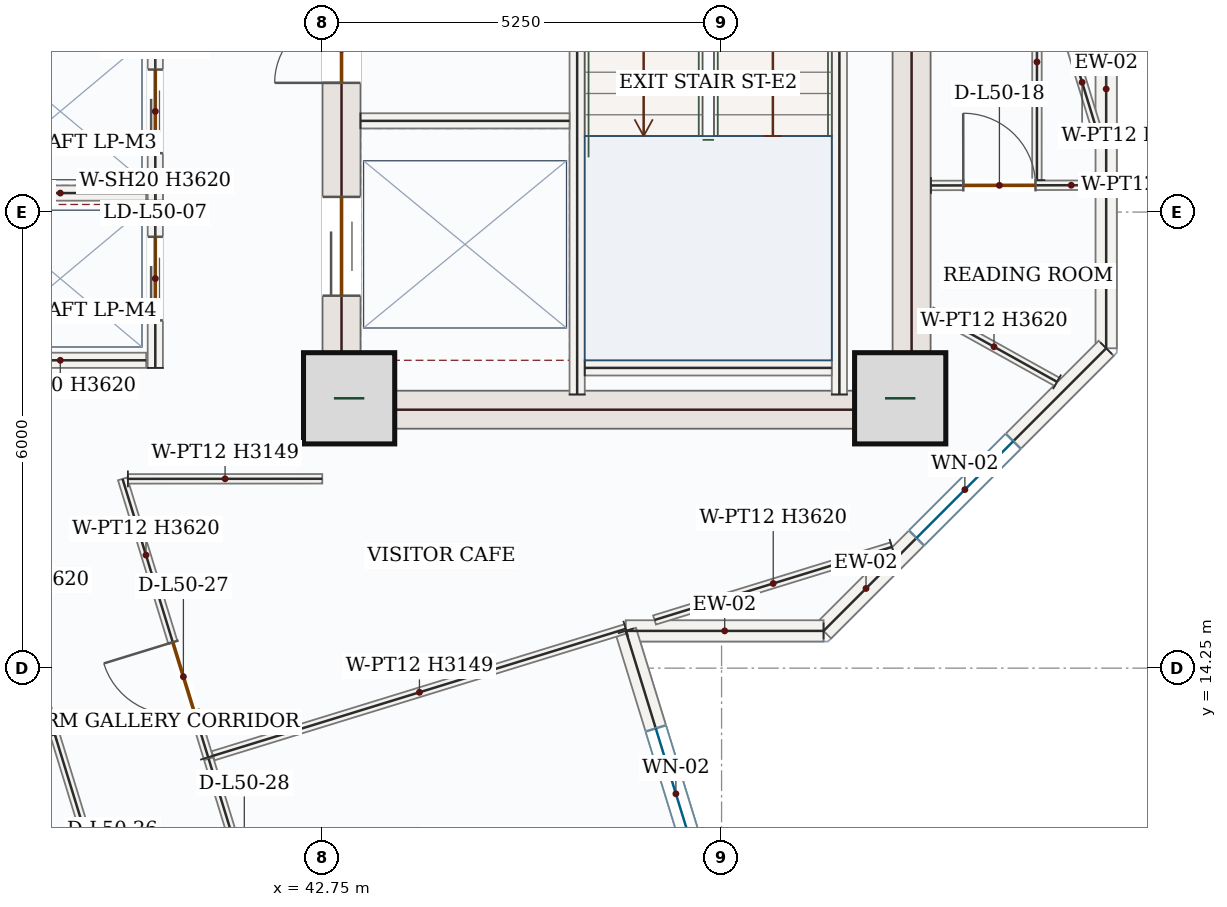
"""IFC4 building model, lengths in metres.
Left out: names, types, materials, properties, quantities, classifications, styles, units other than length and angle.
Written with IfcOpenShell. Run it as: python <this file> out.ifc"""

import sys

from ifc_helpers import new_model, si_unit, direction, frame, frame_2d, origin, origin_2d, place, context, subcontext, project, spatial, rectangle, extrude, source, transform, mapped, element, fill, save


model = new_model("IFC4")
c1 = context("Model", 3, precision=1e-05, world=origin(), true_north=direction((0.0, 1.0)))
c2 = subcontext(c1, "Body", "Model", "MODEL_VIEW")
j1 = project(units=[si_unit("LENGTHUNIT", "METRE"), si_unit("PLANEANGLEUNIT", "RADIAN")], contexts=[c1])
p1 = place(None, origin())
s1 = spatial("IfcSite", under=j1, at=p1, CompositionType="ELEMENT")
p2 = place(p1, origin())
s2 = spatial("IfcBuilding", under=s1, at=p2, CompositionType="ELEMENT")
p3 = place(p2, frame((0.0, 0.0, 213.6)))
s3 = spatial("IfcBuildingStorey", under=s2, at=p3, CompositionType="ELEMENT", Elevation=213.6)
p4 = place(p3, frame((43.0, 17.4, 0.0), z_axis=(0.0, 0.0, 1.0), x_axis=(0.0, 1.0, 0.0)))
e1 = element("IfcWall", 1, at=p4, inside=s3, PredefinedType="SHEAR", context=c2, shape_type="SweptSolid", body=[
    extrude(rectangle(XDim=8.55, YDim=0.5, at=frame_2d((4.275, 0.0))), origin(), (0.0, 0.0, 1.0), 3.62),
])
p5 = place(p4, frame((6.65, 0.0, 0.0)))
e2 = element("IfcOpeningElement", 2, at=p5, cuts=e1, PredefinedType="OPENING", context=c2, shape_type="SweptSolid", body=[
    extrude(rectangle(XDim=1.1, YDim=2.2, at=frame_2d((0.55, 1.1))), frame((0.0, 0.26, 0.0), z_axis=(0.0, -1.0, 0.0), x_axis=(1.0, 0.0, 0.0)), (0.0, 0.0, 1.0), 0.52),
])
p6 = place(p4, frame((1.75, 0.0, 0.0)))
e3 = element("IfcOpeningElement", 3, at=p6, cuts=e1, PredefinedType="OPENING", context=c2, shape_type="SweptSolid", body=[
    extrude(rectangle(XDim=1.3, YDim=2.2, at=frame_2d((0.65, 1.1))), frame((0.0, 0.26, 0.0), z_axis=(0.0, -1.0, 0.0), x_axis=(1.0, 0.0, 0.0)), (0.0, 0.0, 1.0), 0.52),
])
p7 = place(p4, frame((4.55, 0.0, 0.0)))
e4 = element("IfcOpeningElement", 4, at=p7, cuts=e1, PredefinedType="OPENING", context=c2, shape_type="SweptSolid", body=[
    extrude(rectangle(XDim=0.88, YDim=2.1, at=frame_2d((0.44, 1.05))), frame((0.0, 0.26, 0.0), z_axis=(0.0, -1.0, 0.0), x_axis=(1.0, 0.0, 0.0)), (0.0, 0.0, 1.0), 0.52),
])
m1 = source(origin(), c2, "Body", "SweptSolid", [
    extrude(rectangle(XDim=8.55, YDim=0.5, at=frame_2d((4.275, 0.0))), origin(), (0.0, 0.0, 1.0), 3.62),
])
p8 = place(p3, frame((50.5, 17.4, 0.0), z_axis=(0.0, 0.0, 1.0), x_axis=(0.0, 1.0, 0.0)))
e5 = element("IfcWall", 5, at=p8, inside=s3, PredefinedType="SHEAR", context=c2, shape_type="MappedRepresentation", body=[
    mapped(m1, transform((0.0, 0.0, 0.0), x_axis=(1.0, 0.0, 0.0), y_axis=(0.0, 1.0, 0.0), z_axis=(0.0, 0.0, 1.0), scale=1.0)),
])
m2 = source(origin(), c2, "Body", "SweptSolid", [
    extrude(rectangle(XDim=7.0, YDim=0.5, at=frame_2d((3.5, 0.0))), origin(), (0.0, 0.0, 1.0), 3.62),
])
p9 = place(p3, frame((43.25, 17.65, 0.0), z_axis=(0.0, 0.0, 1.0), x_axis=(1.0, 0.0, 0.0)))
e6 = element("IfcWall", 6, at=p9, inside=s3, PredefinedType="SHEAR", context=c2, shape_type="MappedRepresentation", body=[
    mapped(m2, transform((0.0, 0.0, 0.0), x_axis=(1.0, 0.0, 0.0), y_axis=(0.0, 1.0, 0.0), z_axis=(0.0, 0.0, 1.0), scale=1.0)),
])
m3 = source(origin(), c2, "Body", "SweptSolid", [
    extrude(rectangle(XDim=1.2, YDim=1.2, at=origin_2d()), origin(), (0.0, 0.0, 1.0), 3.9),
])
for number, where, z_axis, x_axis in (
    (7, (43.1, 17.8, 0.0), (0.0, 0.0, 1.0), (1.0, 0.0, 0.0)),
    (8, (50.35, 17.8, 0.0), (0.0, 0.0, 1.0), (1.0, 0.0, 0.0)),
):
    element("IfcColumn", number, at=place(p3, frame(where, z_axis=z_axis, x_axis=x_axis)), inside=s3, PredefinedType="COLUMN", context=c2, shape_type="MappedRepresentation", body=[
        mapped(m3, transform((0.0, 0.0, 0.0), x_axis=(1.0, 0.0, 0.0), y_axis=(0.0, 1.0, 0.0), z_axis=(0.0, 0.0, 1.0), scale=1.0)),
    ])
m4 = source(origin(), c2, "Body", "SweptSolid", [
    extrude(rectangle(XDim=6.822, YDim=0.28, at=frame_2d((3.411, 0.0))), origin(), (0.0, 0.0, 1.0), 3.62),
])
p10 = place(p3, frame((53.06, 25.28, 0.0), z_axis=(0.0, 0.0, 1.0), x_axis=(0.0, -1.0, 0.0)))
e9 = element("IfcWall", 9, at=p10, inside=s3, PredefinedType="SOLIDWALL", context=c2, shape_type="MappedRepresentation", body=[
    mapped(m4, transform((0.0, 0.0, 0.0), x_axis=(1.0, 0.0, 0.0), y_axis=(0.0, 1.0, 0.0), z_axis=(0.0, 0.0, 1.0), scale=1.0)),
])
p11 = place(p3, frame((53.06, 18.458, 0.0), z_axis=(0.0, 0.0, 1.0), x_axis=(-0.707106781187, -0.707106781187, 0.0)))
e10 = element("IfcWall", 10, at=p11, inside=s3, PredefinedType="SOLIDWALL", context=c2, shape_type="SweptSolid", body=[
    extrude(rectangle(XDim=5.258, YDim=0.28, at=frame_2d((2.629, 0.0))), origin(), (0.0, 0.0, 1.0), 3.62),
])
p12 = place(p11, frame((1.729, 0.0, 0.85)))
e11 = element("IfcOpeningElement", 11, at=p12, cuts=e10, PredefinedType="OPENING", context=c2, shape_type="SweptSolid", body=[
    extrude(rectangle(XDim=1.8, YDim=1.75, at=frame_2d((0.9, 0.875))), frame((0.0, 0.15, 0.0), z_axis=(0.0, -1.0, 0.0), x_axis=(1.0, 0.0, 0.0)), (0.0, 0.0, 1.0), 0.3),
])
m5 = source(origin(), c2, "Body", "SweptSolid", [
    extrude(rectangle(XDim=2.602, YDim=0.28, at=frame_2d((1.301, 0.0))), origin(), (0.0, 0.0, 1.0), 3.62),
])
p13 = place(p3, frame((49.342, 14.74, 0.0), z_axis=(0.0, 0.0, 1.0), x_axis=(-1.0, 0.0, 0.0)))
e12 = element("IfcWall", 12, at=p13, inside=s3, PredefinedType="SOLIDWALL", context=c2, shape_type="MappedRepresentation", body=[
    mapped(m5, transform((0.0, 0.0, 0.0), x_axis=(1.0, 0.0, 0.0), y_axis=(0.0, 1.0, 0.0), z_axis=(0.0, 0.0, 1.0), scale=1.0)),
])
p14 = place(p3, frame((46.74, 14.74, 0.0), z_axis=(0.0, 0.0, 1.0), x_axis=(0.294009328951, -0.95580254995, 0.0)))
e13 = element("IfcWall", 13, at=p14, inside=s3, PredefinedType="SOLIDWALL", context=c2, shape_type="SweptSolid", body=[
    extrude(rectangle(XDim=4.484, YDim=0.28, at=frame_2d((2.242, 0.0))), origin(), (0.0, 0.0, 1.0), 3.62),
])
p15 = place(p14, frame((1.342, 0.0, 0.85)))
e14 = element("IfcOpeningElement", 14, at=p15, cuts=e13, PredefinedType="OPENING", context=c2, shape_type="SweptSolid", body=[
    extrude(rectangle(XDim=1.8, YDim=1.75, at=frame_2d((0.9, 0.875))), frame((0.0, 0.15, 0.0), z_axis=(0.0, -1.0, 0.0), x_axis=(1.0, 0.0, 0.0)), (0.0, 0.0, 1.0), 0.3),
])
m6 = source(origin(), c2, "Body", "SweptSolid", [
    extrude(rectangle(XDim=7.87, YDim=0.2, at=frame_2d((3.935, 0.0))), origin(), (0.0, 0.0, 1.0), 3.62),
])
p16 = place(p3, frame((49.55, 17.85, 0.0), z_axis=(0.0, 0.0, 1.0), x_axis=(0.0, 1.0, 0.0)))
e15 = element("IfcWall", 15, at=p16, inside=s3, PredefinedType="SOLIDWALL", context=c2, shape_type="MappedRepresentation", body=[
    mapped(m6, transform((0.0, 0.0, 0.0), x_axis=(1.0, 0.0, 0.0), y_axis=(0.0, 1.0, 0.0), z_axis=(0.0, 0.0, 1.0), scale=1.0)),
])
p17 = place(p3, frame((46.1, 17.85, 0.0), z_axis=(0.0, 0.0, 1.0), x_axis=(0.0, 1.0, 0.0)))
e16 = element("IfcWall", 16, at=p17, inside=s3, PredefinedType="SOLIDWALL", context=c2, shape_type="SweptSolid", body=[
    extrude(rectangle(XDim=8.0, YDim=0.2, at=frame_2d((4.0, 0.0))), origin(), (0.0, 0.0, 1.0), 3.62),
])
p18 = place(p17, frame((6.3, 0.0, 0.0)))
e17 = element("IfcOpeningElement", 17, at=p18, cuts=e16, PredefinedType="OPENING", context=c2, shape_type="SweptSolid", body=[
    extrude(rectangle(XDim=1.05, YDim=2.15, at=frame_2d((0.525, 1.075))), frame((0.0, 0.11, 0.0), z_axis=(0.0, -1.0, 0.0), x_axis=(1.0, 0.0, 0.0)), (0.0, 0.0, 1.0), 0.22),
])
m7 = source(origin(), c2, "Body", "SweptSolid", [
    extrude(rectangle(XDim=3.25, YDim=0.2, at=frame_2d((1.625, 0.0))), origin(), (0.0, 0.0, 1.0), 3.62),
])
p19 = place(p3, frame((46.2, 18.2, 0.0), z_axis=(0.0, 0.0, 1.0), x_axis=(1.0, 0.0, 0.0)))
e18 = element("IfcWall", 18, at=p19, inside=s3, PredefinedType="SOLIDWALL", context=c2, shape_type="MappedRepresentation", body=[
    mapped(m7, transform((0.0, 0.0, 0.0), x_axis=(1.0, 0.0, 0.0), y_axis=(0.0, 1.0, 0.0), z_axis=(0.0, 0.0, 1.0), scale=1.0)),
])
m8 = source(origin(), c2, "Body", "SweptSolid", [
    extrude(rectangle(XDim=2.75, YDim=0.2, at=frame_2d((1.375, 0.0))), origin(), (0.0, 0.0, 1.0), 3.62),
])
p20 = place(p3, frame((43.25, 21.45, 0.0), z_axis=(0.0, 0.0, 1.0), x_axis=(1.0, 0.0, 0.0)))
e19 = element("IfcWall", 19, at=p20, inside=s3, PredefinedType="SOLIDWALL", context=c2, shape_type="MappedRepresentation", body=[
    mapped(m8, transform((0.0, 0.0, 0.0), x_axis=(1.0, 0.0, 0.0), y_axis=(0.0, 1.0, 0.0), z_axis=(0.0, 0.0, 1.0), scale=1.0)),
])
p21 = place(p3, frame((40.55, 20.4, 0.0), z_axis=(0.0, 0.0, 1.0), x_axis=(0.0, 1.0, 0.0)))
e20 = element("IfcWall", 20, at=p21, inside=s3, PredefinedType="SOLIDWALL", context=c2, shape_type="SweptSolid", body=[
    extrude(rectangle(XDim=2.35, YDim=0.2, at=frame_2d((1.175, 0.0))), origin(), (0.0, 0.0, 1.0), 3.62),
])
p22 = place(p21, frame((0.625, 0.0, 0.0)))
e21 = element("IfcOpeningElement", 21, at=p22, cuts=e20, PredefinedType="OPENING", context=c2, shape_type="SweptSolid", body=[
    extrude(rectangle(XDim=1.1, YDim=2.15, at=frame_2d((0.55, 1.075))), frame((0.0, 0.11, 0.0), z_axis=(0.0, -1.0, 0.0), x_axis=(1.0, 0.0, 0.0)), (0.0, 0.0, 1.0), 0.22),
])
m9 = source(origin(), c2, "Body", "SweptSolid", [
    extrude(rectangle(XDim=2.26, YDim=0.2, at=frame_2d((1.13, 0.0))), origin(), (0.0, 0.0, 1.0), 3.62),
])
p23 = place(p3, frame((38.17, 20.5, 0.0), z_axis=(0.0, 0.0, 1.0), x_axis=(1.0, 0.0, 0.0)))
e22 = element("IfcWall", 22, at=p23, inside=s3, PredefinedType="SOLIDWALL", context=c2, shape_type="MappedRepresentation", body=[
    mapped(m9, transform((0.0, 0.0, 0.0), x_axis=(1.0, 0.0, 0.0), y_axis=(0.0, 1.0, 0.0), z_axis=(0.0, 0.0, 1.0), scale=1.0)),
])
p24 = place(p3, frame((40.55, 18.2, 0.0), z_axis=(0.0, 0.0, 1.0), x_axis=(0.0, 1.0, 0.0)))
e23 = element("IfcWall", 23, at=p24, inside=s3, PredefinedType="SOLIDWALL", context=c2, shape_type="SweptSolid", body=[
    extrude(rectangle(XDim=2.35, YDim=0.2, at=frame_2d((1.175, 0.0))), origin(), (0.0, 0.0, 1.0), 3.62),
])
p25 = place(p24, frame((0.625, 0.0, 0.0)))
e24 = element("IfcOpeningElement", 24, at=p25, cuts=e23, PredefinedType="OPENING", context=c2, shape_type="SweptSolid", body=[
    extrude(rectangle(XDim=1.1, YDim=2.15, at=frame_2d((0.55, 1.075))), frame((0.0, 0.11, 0.0), z_axis=(0.0, -1.0, 0.0), x_axis=(1.0, 0.0, 0.0)), (0.0, 0.0, 1.0), 0.22),
])
p26 = place(p3, frame((38.17, 18.3, 0.0), z_axis=(0.0, 0.0, 1.0), x_axis=(1.0, 0.0, 0.0)))
e25 = element("IfcWall", 25, at=p26, inside=s3, PredefinedType="SOLIDWALL", context=c2, shape_type="MappedRepresentation", body=[
    mapped(m9, transform((0.0, 0.0, 0.0), x_axis=(1.0, 0.0, 0.0), y_axis=(0.0, 1.0, 0.0), z_axis=(0.0, 0.0, 1.0), scale=1.0)),
])
p27 = place(p3, frame((50.755, 20.6, 0.0), z_axis=(0.0, 0.0, 1.0), x_axis=(0.99999875384, 0.001578708001, 0.0)))
e26 = element("IfcWall", 26, at=p27, inside=s3, PredefinedType="PARTITIONING", context=c2, shape_type="SweptSolid", body=[
    extrude(rectangle(XDim=2.165, YDim=0.125, at=frame_2d((1.083, 0.0))), origin(), (0.0, 0.0, 1.0), 3.62),
])
p28 = place(p27, frame((0.425, 0.0, 0.0)))
e27 = element("IfcOpeningElement", 27, at=p28, cuts=e26, PredefinedType="OPENING", context=c2, shape_type="SweptSolid", body=[
    extrude(rectangle(XDim=0.95, YDim=2.15, at=frame_2d((0.475, 1.075))), frame((0.0, 0.073, 0.0), z_axis=(0.0, -1.0, 0.0), x_axis=(1.0, 0.0, 0.0)), (0.0, 0.0, 1.0), 0.145),
])
m10 = source(origin(), c2, "Body", "SweptSolid", [
    extrude(rectangle(XDim=3.11, YDim=0.125, at=frame_2d((1.555, 0.0))), origin(), (0.0, 0.0, 1.0), 3.62),
])
p29 = place(p3, frame((52.149, 20.67, 0.0), z_axis=(0.0, 0.0, 1.0), x_axis=(0.000392526269, 0.999999922962, 0.0)))
e28 = element("IfcWall", 28, at=p29, inside=s3, PredefinedType="PARTITIONING", context=c2, shape_type="MappedRepresentation", body=[
    mapped(m10, transform((0.0, 0.0, 0.0), x_axis=(1.0, 0.0, 0.0), y_axis=(0.0, 1.0, 0.0), z_axis=(0.0, 0.0, 1.0), scale=1.0)),
])
m11 = source(origin(), c2, "Body", "SweptSolid", [
    extrude(rectangle(XDim=1.18, YDim=0.125, at=frame_2d((0.59, 0.0))), origin(), (0.0, 0.0, 1.0), 3.62),
])
p30 = place(p3, frame((52.57, 22.521, 0.0), z_axis=(0.0, 0.0, 1.0), x_axis=(0.293984081944, -0.955810315682, 0.0)))
e29 = element("IfcWall", 29, at=p30, inside=s3, PredefinedType="PARTITIONING", context=c2, shape_type="MappedRepresentation", body=[
    mapped(m11, transform((0.0, 0.0, 0.0), x_axis=(1.0, 0.0, 0.0), y_axis=(0.0, 1.0, 0.0), z_axis=(0.0, 0.0, 1.0), scale=1.0)),
])
m12 = source(origin(), c2, "Body", "SweptSolid", [
    extrude(rectangle(XDim=1.898, YDim=0.125, at=frame_2d((0.949, 0.0))), origin(), (0.0, 0.0, 1.0), 3.62),
])
p31 = place(p3, frame((52.414, 18.017, 0.0), z_axis=(0.0, 0.0, 1.0), x_axis=(-0.873799105313, 0.486287079362, 0.0)))
e30 = element("IfcWall", 30, at=p31, inside=s3, PredefinedType="PARTITIONING", context=c2, shape_type="MappedRepresentation", body=[
    mapped(m12, transform((0.0, 0.0, 0.0), x_axis=(1.0, 0.0, 0.0), y_axis=(0.0, 1.0, 0.0), z_axis=(0.0, 0.0, 1.0), scale=1.0)),
])
p32 = place(p3, frame((41.246, 13.077, 0.0), z_axis=(0.0, 0.0, 1.0), x_axis=(-0.294050037582, 0.955790026836, 0.0)))
e31 = element("IfcWall", 31, at=p32, inside=s3, PredefinedType="PARTITIONING", context=c2, shape_type="SweptSolid", body=[
    extrude(rectangle(XDim=3.833, YDim=0.125, at=frame_2d((1.916, 0.0))), origin(), (0.0, 0.0, 1.0), 3.62),
])
p33 = place(p32, frame((0.634, 0.0, 0.0)))
e32 = element("IfcOpeningElement", 32, at=p33, cuts=e31, PredefinedType="OPENING", context=c2, shape_type="SweptSolid", body=[
    extrude(rectangle(XDim=0.95, YDim=2.15, at=frame_2d((0.475, 1.075))), frame((0.0, 0.073, 0.0), z_axis=(0.0, -1.0, 0.0), x_axis=(1.0, 0.0, 0.0)), (0.0, 0.0, 1.0), 0.145),
])
m13 = source(origin(), c2, "Body", "SweptSolid", [
    extrude(rectangle(XDim=2.557, YDim=0.125, at=frame_2d((1.278, 0.0))), origin(), (0.0, 0.0, 1.0), 3.149),
])
p34 = place(p3, frame((40.19, 16.74, 0.0), z_axis=(0.0, 0.0, 1.0), x_axis=(0.999999886036, 0.000477418068, 0.0)))
e33 = element("IfcWall", 33, at=p34, inside=s3, PredefinedType="PARTITIONING", context=c2, shape_type="MappedRepresentation", body=[
    mapped(m13, transform((0.0, 0.0, 0.0), x_axis=(1.0, 0.0, 0.0), y_axis=(0.0, 1.0, 0.0), z_axis=(0.0, 0.0, 1.0), scale=1.0)),
])
m14 = source(origin(), c2, "Body", "SweptSolid", [
    extrude(rectangle(XDim=3.268, YDim=0.125, at=frame_2d((1.634, 0.0))), origin(), (0.0, 0.0, 1.0), 3.62),
])
p35 = place(p3, frame((50.241, 15.844, 0.0), z_axis=(0.0, 0.0, 1.0), x_axis=(-0.955791929964, -0.294043851519, 0.0)))
e34 = element("IfcWall", 34, at=p35, inside=s3, PredefinedType="PARTITIONING", context=c2, shape_type="MappedRepresentation", body=[
    mapped(m14, transform((0.0, 0.0, 0.0), x_axis=(1.0, 0.0, 0.0), y_axis=(0.0, 1.0, 0.0), z_axis=(0.0, 0.0, 1.0), scale=1.0)),
])
m15 = source(origin(), c2, "Body", "SweptSolid", [
    extrude(rectangle(XDim=5.68, YDim=0.125, at=frame_2d((2.84, 0.0))), origin(), (0.0, 0.0, 1.0), 3.149),
])
p36 = place(p3, frame((46.74, 14.767, 0.0), z_axis=(0.0, 0.0, 1.0), x_axis=(-0.955800379324, -0.294016385402, 0.0)))
e35 = element("IfcWall", 35, at=p36, inside=s3, PredefinedType="PARTITIONING", context=c2, shape_type="MappedRepresentation", body=[
    mapped(m15, transform((0.0, 0.0, 0.0), x_axis=(1.0, 0.0, 0.0), y_axis=(0.0, 1.0, 0.0), z_axis=(0.0, 0.0, 1.0), scale=1.0)),
])
m16 = source(origin(), c2, "Body", "SweptSolid", [
    extrude(rectangle(XDim=3.498, YDim=0.125, at=frame_2d((1.749, 0.0))), origin(), (0.0, 0.0, 1.0), 3.62),
])
p37 = place(p3, frame((38.194, 16.74, 0.0), z_axis=(0.0, 0.0, 1.0), x_axis=(0.294012288782, -0.955801639487, 0.0)))
e36 = element("IfcWall", 36, at=p37, inside=s3, PredefinedType="PARTITIONING", context=c2, shape_type="MappedRepresentation", body=[
    mapped(m16, transform((0.0, 0.0, 0.0), x_axis=(1.0, 0.0, 0.0), y_axis=(0.0, 1.0, 0.0), z_axis=(0.0, 0.0, 1.0), scale=1.0)),
])
m17 = source(origin(), c2, "Body", "SweptSolid", [
    extrude(rectangle(XDim=5.595, YDim=0.125, at=frame_2d((2.797, 0.0))), origin(), (0.0, 0.0, 1.0), 3.62),
])
p38 = place(p3, frame((39.222, 13.396, 0.0), z_axis=(0.0, 0.0, 1.0), x_axis=(-0.955787499516, -0.294058252339, 0.0)))
e37 = element("IfcWall", 37, at=p38, inside=s3, PredefinedType="PARTITIONING", context=c2, shape_type="MappedRepresentation", body=[
    mapped(m17, transform((0.0, 0.0, 0.0), x_axis=(1.0, 0.0, 0.0), y_axis=(0.0, 1.0, 0.0), z_axis=(0.0, 0.0, 1.0), scale=1.0)),
])
p39 = place(p3, frame((43.029, 7.28, 0.0), z_axis=(0.0, 0.0, 1.0), x_axis=(-0.294054630952, 0.955788613667, 0.0)))
e38 = element("IfcWall", 38, at=p39, inside=s3, PredefinedType="PARTITIONING", context=c2, shape_type="SweptSolid", body=[
    extrude(rectangle(XDim=6.045, YDim=0.125, at=frame_2d((3.022, 0.0))), origin(), (0.0, 0.0, 1.0), 3.62),
])
p40 = place(p39, frame((3.974, 0.0, 0.0)))
e39 = element("IfcOpeningElement", 39, at=p40, cuts=e38, PredefinedType="OPENING", context=c2, shape_type="SweptSolid", body=[
    extrude(rectangle(XDim=0.95, YDim=2.15, at=frame_2d((0.475, 1.075))), frame((0.0, 0.073, 0.0), z_axis=(0.0, -1.0, 0.0), x_axis=(1.0, 0.0, 0.0)), (0.0, 0.0, 1.0), 0.145),
])
p41 = place(p3, frame((39.229, 13.377, 0.0), z_axis=(0.0, 0.0, 1.0), x_axis=(0.294016682873, -0.955800287818, 0.0)))
e40 = element("IfcWall", 40, at=p41, inside=s3, PredefinedType="PARTITIONING", context=c2, shape_type="SweptSolid", body=[
    extrude(rectangle(XDim=6.945, YDim=0.125, at=frame_2d((3.473, 0.0))), origin(), (0.0, 0.0, 1.0), 3.62),
])
p42 = place(p41, frame((2.098, 0.0, 0.0)))
e41 = element("IfcOpeningElement", 41, at=p42, cuts=e40, PredefinedType="OPENING", context=c2, shape_type="SweptSolid", body=[
    extrude(rectangle(XDim=0.95, YDim=2.15, at=frame_2d((0.475, 1.075))), frame((0.0, 0.073, 0.0), z_axis=(0.0, -1.0, 0.0), x_axis=(1.0, 0.0, 0.0)), (0.0, 0.0, 1.0), 0.145),
])
m18 = source(origin(), c2, "Body", "SweptSolid", [
    extrude(rectangle(XDim=1.8, YDim=1.75, at=frame_2d((0.9, 0.875))), frame((0.0, 0.03, 0.0), z_axis=(0.0, -1.0, 0.0), x_axis=(1.0, 0.0, 0.0)), (0.0, 0.0, 1.0), 0.06),
])
p43 = place(p12, origin())
e42 = element("IfcWindow", 42, at=p43, inside=s3, PartitioningType="DOUBLE_PANEL_VERTICAL", PredefinedType="WINDOW", context=c2, shape_type="MappedRepresentation", body=[
    mapped(m18, transform((0.0, 0.0, 0.0), x_axis=(1.0, 0.0, 0.0), y_axis=(0.0, 1.0, 0.0), z_axis=(0.0, 0.0, 1.0), scale=1.0)),
])
fill(e11, e42)
p44 = place(p15, origin())
e43 = element("IfcWindow", 43, at=p44, inside=s3, PartitioningType="DOUBLE_PANEL_VERTICAL", PredefinedType="WINDOW", context=c2, shape_type="MappedRepresentation", body=[
    mapped(m18, transform((0.0, 0.0, 0.0), x_axis=(1.0, 0.0, 0.0), y_axis=(0.0, 1.0, 0.0), z_axis=(0.0, 0.0, 1.0), scale=1.0)),
])
fill(e14, e43)
m19 = source(origin(), c2, "Body", "SweptSolid", [
    extrude(rectangle(XDim=1.3, YDim=2.2, at=frame_2d((0.65, 1.1))), frame((0.0, 0.025, 0.0), z_axis=(0.0, -1.0, 0.0), x_axis=(1.0, 0.0, 0.0)), (0.0, 0.0, 1.0), 0.05),
])
p45 = place(p6, origin())
e44 = element("IfcDoor", 44, at=p45, inside=s3, OperationType="DOUBLE_DOOR_SLIDING", PredefinedType="DOOR", context=c2, shape_type="MappedRepresentation", body=[
    mapped(m19, transform((0.0, 0.0, 0.0), x_axis=(1.0, 0.0, 0.0), y_axis=(0.0, 1.0, 0.0), z_axis=(0.0, 0.0, 1.0), scale=1.0)),
])
fill(e3, e44)
m20 = source(origin(), c2, "Body", "SweptSolid", [
    extrude(rectangle(XDim=0.88, YDim=2.1, at=frame_2d((0.44, 1.05))), frame((0.0, 0.025, 0.0), z_axis=(0.0, -1.0, 0.0), x_axis=(1.0, 0.0, 0.0)), (0.0, 0.0, 1.0), 0.05),
])
p46 = place(p7, origin())
e45 = element("IfcDoor", 45, at=p46, inside=s3, OperationType="SINGLE_SWING_LEFT", PredefinedType="DOOR", context=c2, shape_type="MappedRepresentation", body=[
    mapped(m20, transform((0.0, 0.0, 0.0), x_axis=(1.0, 0.0, 0.0), y_axis=(0.0, 1.0, 0.0), z_axis=(0.0, 0.0, 1.0), scale=1.0)),
])
fill(e4, e45)
m21 = source(origin(), c2, "Body", "SweptSolid", [
    extrude(rectangle(XDim=1.1, YDim=2.15, at=frame_2d((0.55, 1.075))), frame((0.0, 0.025, 0.0), z_axis=(0.0, -1.0, 0.0), x_axis=(1.0, 0.0, 0.0)), (0.0, 0.0, 1.0), 0.05),
])
p47 = place(p22, origin())
e46 = element("IfcDoor", 46, at=p47, inside=s3, OperationType="DOUBLE_DOOR_SLIDING", PredefinedType="DOOR", context=c2, shape_type="MappedRepresentation", body=[
    mapped(m21, transform((0.0, 0.0, 0.0), x_axis=(1.0, 0.0, 0.0), y_axis=(0.0, 1.0, 0.0), z_axis=(0.0, 0.0, 1.0), scale=1.0)),
])
fill(e21, e46)
p48 = place(p25, origin())
e47 = element("IfcDoor", 47, at=p48, inside=s3, OperationType="DOUBLE_DOOR_SLIDING", PredefinedType="DOOR", context=c2, shape_type="MappedRepresentation", body=[
    mapped(m21, transform((0.0, 0.0, 0.0), x_axis=(1.0, 0.0, 0.0), y_axis=(0.0, 1.0, 0.0), z_axis=(0.0, 0.0, 1.0), scale=1.0)),
])
fill(e24, e47)
m22 = source(origin(), c2, "Body", "SweptSolid", [
    extrude(rectangle(XDim=0.95, YDim=2.15, at=frame_2d((0.475, 1.075))), frame((0.0, 0.025, 0.0), z_axis=(0.0, -1.0, 0.0), x_axis=(1.0, 0.0, 0.0)), (0.0, 0.0, 1.0), 0.05),
])
p49 = place(p28, origin())
e48 = element("IfcDoor", 48, at=p49, inside=s3, OperationType="SINGLE_SWING_LEFT", PredefinedType="DOOR", context=c2, shape_type="MappedRepresentation", body=[
    mapped(m22, transform((0.0, 0.0, 0.0), x_axis=(1.0, 0.0, 0.0), y_axis=(0.0, 1.0, 0.0), z_axis=(0.0, 0.0, 1.0), scale=1.0)),
])
fill(e27, e48)
p50 = place(p33, origin())
e49 = element("IfcDoor", 49, at=p50, inside=s3, OperationType="SINGLE_SWING_RIGHT", PredefinedType="DOOR", context=c2, shape_type="MappedRepresentation", body=[
    mapped(m22, transform((0.0, 0.0, 0.0), x_axis=(1.0, 0.0, 0.0), y_axis=(0.0, 1.0, 0.0), z_axis=(0.0, 0.0, 1.0), scale=1.0)),
])
fill(e32, e49)
save(model, sys.argv[1])
